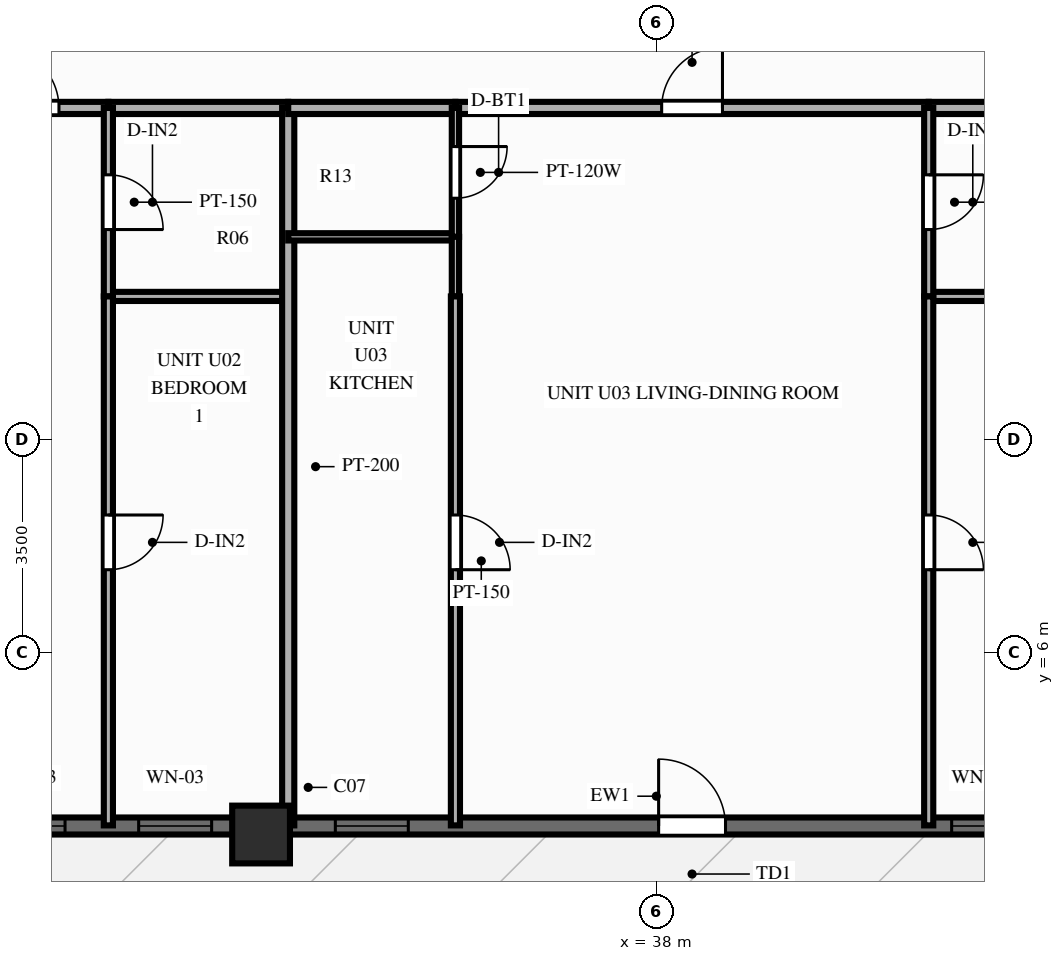
"""IFC4 building model, lengths in metres.
Left out: names, types, materials, properties, quantities, classifications, styles, units other than length and angle.
Written with IfcOpenShell. Run it as: python <this file> out.ifc"""

import sys

from ifc_helpers import new_model, si_unit, direction, frame, frame_2d, origin, origin_2d, place, context, subcontext, project, spatial, rectangle, extrude, source, transform, mapped, element, fill, save


model = new_model("IFC4")
c1 = context("Model", 3, precision=1e-05, world=origin(), true_north=direction((0.0, 1.0)))
c2 = subcontext(c1, "Body", "Model", "MODEL_VIEW")
j1 = project(units=[si_unit("LENGTHUNIT", "METRE"), si_unit("PLANEANGLEUNIT", "RADIAN")], contexts=[c1])
p1 = place(None, origin())
s1 = spatial("IfcSite", under=j1, at=p1, CompositionType="ELEMENT")
p2 = place(p1, origin())
s2 = spatial("IfcBuilding", under=s1, at=p2, CompositionType="ELEMENT")
p3 = place(p2, frame((0.0, 0.0, 77.85)))
s3 = spatial("IfcBuildingStorey", under=s2, at=p3, CompositionType="ELEMENT", Elevation=77.85)
m1 = source(origin(), c2, "Body", "SweptSolid", [
    extrude(rectangle(XDim=0.95, YDim=0.95, at=origin_2d()), origin(), (0.0, 0.0, 1.0), 3.0),
])
p4 = place(p3, frame((31.5, 3.0, 0.0), z_axis=(0.0, 0.0, 1.0), x_axis=(1.0, 0.0, 0.0)))
e1 = element("IfcColumn", 1, at=p4, inside=s3, PredefinedType="COLUMN", context=c2, shape_type="MappedRepresentation", body=[
    mapped(m1, transform((0.0, 0.0, 0.0), scale=1.0)),
])
p5 = place(p3, frame((16.2, 3.14, 0.0), z_axis=(0.0, 0.0, 1.0), x_axis=(1.0, 0.0, 0.0)))
e2 = element("IfcWall", 2, at=p5, inside=s3, PredefinedType="SOLIDWALL", context=c2, shape_type="SweptSolid", body=[
    extrude(rectangle(XDim=43.6, YDim=0.28, at=frame_2d((21.8, 0.0))), origin(), (0.0, 0.0, 1.0), 2.28),
])
p6 = place(p5, frame((0.748, 0.0, 0.25)))
e3 = element("IfcOpeningElement", 3, at=p6, cuts=e2, PredefinedType="OPENING", context=c2, shape_type="SweptSolid", body=[
    extrude(rectangle(XDim=1.2, YDim=1.5, at=frame_2d((0.6, 0.75))), frame((0.0, 0.152, 0.0), z_axis=(0.0, -1.0, 0.0), x_axis=(1.0, 0.0, 0.0)), (0.0, 0.0, 1.0), 0.304),
])
p7 = place(p5, frame((3.093, 0.0, 0.25)))
e4 = element("IfcOpeningElement", 4, at=p7, cuts=e2, PredefinedType="OPENING", context=c2, shape_type="SweptSolid", body=[
    extrude(rectangle(XDim=1.2, YDim=1.5, at=frame_2d((0.6, 0.75))), frame((0.0, 0.152, 0.0), z_axis=(0.0, -1.0, 0.0), x_axis=(1.0, 0.0, 0.0)), (0.0, 0.0, 1.0), 0.304),
])
p8 = place(p5, frame((5.885, 0.0, 0.25)))
e5 = element("IfcOpeningElement", 5, at=p8, cuts=e2, PredefinedType="OPENING", context=c2, shape_type="SweptSolid", body=[
    extrude(rectangle(XDim=1.2, YDim=1.5, at=frame_2d((0.6, 0.75))), frame((0.0, 0.152, 0.0), z_axis=(0.0, -1.0, 0.0), x_axis=(1.0, 0.0, 0.0)), (0.0, 0.0, 1.0), 0.304),
])
p9 = place(p5, frame((8.463, 0.0, 0.25)))
e6 = element("IfcOpeningElement", 6, at=p9, cuts=e2, PredefinedType="OPENING", context=c2, shape_type="SweptSolid", body=[
    extrude(rectangle(XDim=1.2, YDim=1.5, at=frame_2d((0.6, 0.75))), frame((0.0, 0.152, 0.0), z_axis=(0.0, -1.0, 0.0), x_axis=(1.0, 0.0, 0.0)), (0.0, 0.0, 1.0), 0.304),
])
p10 = place(p5, frame((10.876, 0.0, 0.25)))
e7 = element("IfcOpeningElement", 7, at=p10, cuts=e2, PredefinedType="OPENING", context=c2, shape_type="SweptSolid", body=[
    extrude(rectangle(XDim=1.2, YDim=1.5, at=frame_2d((0.6, 0.75))), frame((0.0, 0.152, 0.0), z_axis=(0.0, -1.0, 0.0), x_axis=(1.0, 0.0, 0.0)), (0.0, 0.0, 1.0), 0.304),
])
p11 = place(p5, frame((13.287, 0.0, 0.25)))
e8 = element("IfcOpeningElement", 8, at=p11, cuts=e2, PredefinedType="OPENING", context=c2, shape_type="SweptSolid", body=[
    extrude(rectangle(XDim=1.2, YDim=1.5, at=frame_2d((0.6, 0.75))), frame((0.0, 0.152, 0.0), z_axis=(0.0, -1.0, 0.0), x_axis=(1.0, 0.0, 0.0)), (0.0, 0.0, 1.0), 0.304),
])
p12 = place(p5, frame((16.521, 0.0, 0.25)))
e9 = element("IfcOpeningElement", 9, at=p12, cuts=e2, PredefinedType="OPENING", context=c2, shape_type="SweptSolid", body=[
    extrude(rectangle(XDim=1.2, YDim=1.5, at=frame_2d((0.6, 0.75))), frame((0.0, 0.152, 0.0), z_axis=(0.0, -1.0, 0.0), x_axis=(1.0, 0.0, 0.0)), (0.0, 0.0, 1.0), 0.304),
])
p13 = place(p5, frame((22.938, 0.0, 0.0), z_axis=(0.0, 0.0, 1.0), x_axis=(-1.0, 0.0, 0.0)))
e10 = element("IfcOpeningElement", 10, at=p13, cuts=e2, PredefinedType="OPENING", context=c2, shape_type="SweptSolid", body=[
    extrude(rectangle(XDim=1.1, YDim=2.15, at=frame_2d((0.55, 1.075))), frame((0.0, 0.152, 0.0), z_axis=(0.0, -1.0, 0.0), x_axis=(1.0, 0.0, 0.0)), (0.0, 0.0, 1.0), 0.304),
])
p14 = place(p5, frame((26.657, 0.0, 0.25)))
e11 = element("IfcOpeningElement", 11, at=p14, cuts=e2, PredefinedType="OPENING", context=c2, shape_type="SweptSolid", body=[
    extrude(rectangle(XDim=0.95, YDim=1.5, at=frame_2d((0.475, 0.75))), frame((0.0, 0.152, 0.0), z_axis=(0.0, -1.0, 0.0), x_axis=(1.0, 0.0, 0.0)), (0.0, 0.0, 1.0), 0.304),
])
p15 = place(p5, frame((28.965, 0.0, 0.25)))
e12 = element("IfcOpeningElement", 12, at=p15, cuts=e2, PredefinedType="OPENING", context=c2, shape_type="SweptSolid", body=[
    extrude(rectangle(XDim=0.7, YDim=1.5, at=frame_2d((0.35, 0.75))), frame((0.0, 0.152, 0.0), z_axis=(0.0, -1.0, 0.0), x_axis=(1.0, 0.0, 0.0)), (0.0, 0.0, 1.0), 0.304),
])
p16 = place(p5, frame((31.158, 0.0, 0.25)))
e13 = element("IfcOpeningElement", 13, at=p16, cuts=e2, PredefinedType="OPENING", context=c2, shape_type="SweptSolid", body=[
    extrude(rectangle(XDim=1.2, YDim=1.5, at=frame_2d((0.6, 0.75))), frame((0.0, 0.152, 0.0), z_axis=(0.0, -1.0, 0.0), x_axis=(1.0, 0.0, 0.0)), (0.0, 0.0, 1.0), 0.304),
])
p17 = place(p5, frame((35.992, 0.0, 0.25)))
e14 = element("IfcOpeningElement", 14, at=p17, cuts=e2, PredefinedType="OPENING", context=c2, shape_type="SweptSolid", body=[
    extrude(rectangle(XDim=1.2, YDim=1.5, at=frame_2d((0.6, 0.75))), frame((0.0, 0.152, 0.0), z_axis=(0.0, -1.0, 0.0), x_axis=(1.0, 0.0, 0.0)), (0.0, 0.0, 1.0), 0.304),
])
p18 = place(p5, frame((40.885, 0.0, 0.25)))
e15 = element("IfcOpeningElement", 15, at=p18, cuts=e2, PredefinedType="OPENING", context=c2, shape_type="SweptSolid", body=[
    extrude(rectangle(XDim=1.2, YDim=1.5, at=frame_2d((0.6, 0.75))), frame((0.0, 0.152, 0.0), z_axis=(0.0, -1.0, 0.0), x_axis=(1.0, 0.0, 0.0)), (0.0, 0.0, 1.0), 0.304),
])
p19 = place(p3, frame((26.363, 14.95, 0.0), z_axis=(0.0, 0.0, 1.0), x_axis=(1.0, 0.0, 0.0)))
e16 = element("IfcWall", 16, at=p19, inside=s3, PredefinedType="PARTITIONING", context=c2, shape_type="SweptSolid", body=[
    extrude(rectangle(XDim=2.625, YDim=0.2, at=frame_2d((1.313, 0.0))), origin(), (0.0, 0.0, 1.0), 2.79),
])
p20 = place(p19, frame((0.813, 0.0, 0.0)))
e17 = element("IfcOpeningElement", 17, at=p20, cuts=e16, PredefinedType="OPENING", context=c2, shape_type="SweptSolid", body=[
    extrude(rectangle(XDim=1.0, YDim=2.15, at=frame_2d((0.5, 1.075))), frame((0.0, 0.112, 0.0), z_axis=(0.0, -1.0, 0.0), x_axis=(1.0, 0.0, 0.0)), (0.0, 0.0, 1.0), 0.224),
])
p21 = place(p3, frame((28.989, 14.95, 0.0), z_axis=(0.0, 0.0, 1.0), x_axis=(1.0, 0.0, 0.0)))
e18 = element("IfcWall", 18, at=p21, inside=s3, PredefinedType="PARTITIONING", context=c2, shape_type="SweptSolid", body=[
    extrude(rectangle(XDim=2.958, YDim=0.2, at=frame_2d((1.479, 0.0))), origin(), (0.0, 0.0, 1.0), 2.79),
])
p22 = place(p3, frame((28.989, 11.85, 0.0), z_axis=(0.0, 0.0, 1.0), x_axis=(1.0, 0.0, 0.0)))
e19 = element("IfcWall", 19, at=p22, inside=s3, PredefinedType="PARTITIONING", context=c2, shape_type="SweptSolid", body=[
    extrude(rectangle(XDim=2.958, YDim=0.15, at=frame_2d((1.479, 0.0))), origin(), (0.0, 0.0, 1.0), 2.79),
])
p23 = place(p3, frame((28.989, 14.95, 0.0), z_axis=(0.0, 0.0, 1.0), x_axis=(0.0, -1.0, 0.0)))
e20 = element("IfcWall", 20, at=p23, inside=s3, PredefinedType="PARTITIONING", context=c2, shape_type="SweptSolid", body=[
    extrude(rectangle(XDim=3.1, YDim=0.15, at=frame_2d((1.55, 0.0))), origin(), (0.0, 0.0, 1.0), 2.79),
])
p24 = place(p23, frame((1.1, 0.0, 0.0)))
e21 = element("IfcOpeningElement", 21, at=p24, cuts=e20, PredefinedType="OPENING", context=c2, shape_type="SweptSolid", body=[
    extrude(rectangle(XDim=0.9, YDim=2.1, at=frame_2d((0.45, 1.05))), frame((0.0, 0.087, 0.0), z_axis=(0.0, -1.0, 0.0), x_axis=(1.0, 0.0, 0.0)), (0.0, 0.0, 1.0), 0.174),
])
p25 = place(p3, frame((28.989, 11.85, 0.0), z_axis=(0.0, 0.0, 1.0), x_axis=(0.0, -1.0, 0.0)))
e22 = element("IfcWall", 22, at=p25, inside=s3, PredefinedType="PARTITIONING", context=c2, shape_type="SweptSolid", body=[
    extrude(rectangle(XDim=8.7, YDim=0.15, at=frame_2d((4.35, 0.0))), origin(), (0.0, 0.0, 1.0), 2.79),
])
p26 = place(p25, frame((3.595, 0.0, 0.0)))
e23 = element("IfcOpeningElement", 23, at=p26, cuts=e22, PredefinedType="OPENING", context=c2, shape_type="SweptSolid", body=[
    extrude(rectangle(XDim=0.9, YDim=2.1, at=frame_2d((0.45, 1.05))), frame((0.0, 0.087, 0.0), z_axis=(0.0, -1.0, 0.0), x_axis=(1.0, 0.0, 0.0)), (0.0, 0.0, 1.0), 0.174),
])
p27 = place(p3, frame((31.946, 14.95, 0.0), z_axis=(0.0, 0.0, 1.0), x_axis=(0.0, -1.0, 0.0)))
e24 = element("IfcWall", 24, at=p27, inside=s3, PredefinedType="PARTITIONING", context=c2, shape_type="SweptSolid", body=[
    extrude(rectangle(XDim=11.8, YDim=0.2, at=frame_2d((5.9, 0.0))), origin(), (0.0, 0.0, 1.0), 2.79),
])
p28 = place(p3, frame((31.946, 14.95, 0.0), z_axis=(0.0, 0.0, 1.0), x_axis=(1.0, 0.0, 0.0)))
e25 = element("IfcWall", 25, at=p28, inside=s3, PredefinedType="PARTITIONING", context=c2, shape_type="SweptSolid", body=[
    extrude(rectangle(XDim=2.75, YDim=0.2, at=frame_2d((1.375, 0.0))), origin(), (0.0, 0.0, 1.0), 2.79),
])
p29 = place(p3, frame((34.696, 14.95, 0.0), z_axis=(0.0, 0.0, 1.0), x_axis=(1.0, 0.0, 0.0)))
e26 = element("IfcWall", 26, at=p29, inside=s3, PredefinedType="PARTITIONING", context=c2, shape_type="SweptSolid", body=[
    extrude(rectangle(XDim=7.784, YDim=0.2, at=frame_2d((3.892, 0.0))), origin(), (0.0, 0.0, 1.0), 2.79),
])
p30 = place(p29, frame((3.392, 0.0, 0.0)))
e27 = element("IfcOpeningElement", 27, at=p30, cuts=e26, PredefinedType="OPENING", context=c2, shape_type="SweptSolid", body=[
    extrude(rectangle(XDim=1.0, YDim=2.15, at=frame_2d((0.5, 1.075))), frame((0.0, 0.112, 0.0), z_axis=(0.0, -1.0, 0.0), x_axis=(1.0, 0.0, 0.0)), (0.0, 0.0, 1.0), 0.224),
])
p31 = place(p3, frame((42.48, 14.95, 0.0), z_axis=(0.0, 0.0, 1.0), x_axis=(1.0, 0.0, 0.0)))
e28 = element("IfcWall", 28, at=p31, inside=s3, PredefinedType="PARTITIONING", context=c2, shape_type="SweptSolid", body=[
    extrude(rectangle(XDim=3.736, YDim=0.2, at=frame_2d((1.868, 0.0))), origin(), (0.0, 0.0, 1.0), 2.79),
])
p32 = place(p3, frame((31.946, 12.83, 0.0), z_axis=(0.0, 0.0, 1.0), x_axis=(1.0, 0.0, 0.0)))
e29 = element("IfcWall", 29, at=p32, inside=s3, PredefinedType="PARTITIONING", context=c2, shape_type="SweptSolid", body=[
    extrude(rectangle(XDim=2.75, YDim=0.12, at=frame_2d((1.375, 0.0))), origin(), (0.0, 0.0, 1.0), 2.79),
])
p33 = place(p3, frame((42.48, 11.85, 0.0), z_axis=(0.0, 0.0, 1.0), x_axis=(1.0, 0.0, 0.0)))
e30 = element("IfcWall", 30, at=p33, inside=s3, PredefinedType="PARTITIONING", context=c2, shape_type="SweptSolid", body=[
    extrude(rectangle(XDim=3.736, YDim=0.15, at=frame_2d((1.868, 0.0))), origin(), (0.0, 0.0, 1.0), 2.79),
])
p34 = place(p3, frame((34.696, 14.95, 0.0), z_axis=(0.0, 0.0, 1.0), x_axis=(0.0, -1.0, 0.0)))
e31 = element("IfcWall", 31, at=p34, inside=s3, PredefinedType="PARTITIONING", context=c2, shape_type="SweptSolid", body=[
    extrude(rectangle(XDim=2.12, YDim=0.12, at=frame_2d((1.06, 0.0))), origin(), (0.0, 0.0, 1.0), 2.79),
])
p35 = place(p34, frame((0.635, 0.0, 0.0)))
e32 = element("IfcOpeningElement", 32, at=p35, cuts=e31, PredefinedType="OPENING", context=c2, shape_type="SweptSolid", body=[
    extrude(rectangle(XDim=0.85, YDim=2.05, at=frame_2d((0.425, 1.025))), frame((0.0, 0.072, 0.0), z_axis=(0.0, -1.0, 0.0), x_axis=(1.0, 0.0, 0.0)), (0.0, 0.0, 1.0), 0.144),
])
p36 = place(p3, frame((34.696, 12.83, 0.0), z_axis=(0.0, 0.0, 1.0), x_axis=(0.0, -1.0, 0.0)))
e33 = element("IfcWall", 33, at=p36, inside=s3, PredefinedType="PARTITIONING", context=c2, shape_type="SweptSolid", body=[
    extrude(rectangle(XDim=0.98, YDim=0.12, at=frame_2d((0.49, 0.0))), origin(), (0.0, 0.0, 1.0), 2.79),
])
p37 = place(p3, frame((34.696, 11.85, 0.0), z_axis=(0.0, 0.0, 1.0), x_axis=(0.0, -1.0, 0.0)))
e34 = element("IfcWall", 34, at=p37, inside=s3, PredefinedType="PARTITIONING", context=c2, shape_type="SweptSolid", body=[
    extrude(rectangle(XDim=8.7, YDim=0.15, at=frame_2d((4.35, 0.0))), origin(), (0.0, 0.0, 1.0), 2.79),
])
p38 = place(p37, frame((3.595, 0.0, 0.0)))
e35 = element("IfcOpeningElement", 35, at=p38, cuts=e34, PredefinedType="OPENING", context=c2, shape_type="SweptSolid", body=[
    extrude(rectangle(XDim=0.9, YDim=2.1, at=frame_2d((0.45, 1.05))), frame((0.0, 0.087, 0.0), z_axis=(0.0, -1.0, 0.0), x_axis=(1.0, 0.0, 0.0)), (0.0, 0.0, 1.0), 0.174),
])
p39 = place(p3, frame((42.48, 14.95, 0.0), z_axis=(0.0, 0.0, 1.0), x_axis=(0.0, -1.0, 0.0)))
e36 = element("IfcWall", 36, at=p39, inside=s3, PredefinedType="PARTITIONING", context=c2, shape_type="SweptSolid", body=[
    extrude(rectangle(XDim=3.1, YDim=0.15, at=frame_2d((1.55, 0.0))), origin(), (0.0, 0.0, 1.0), 2.79),
])
p40 = place(p39, frame((1.1, 0.0, 0.0)))
e37 = element("IfcOpeningElement", 37, at=p40, cuts=e36, PredefinedType="OPENING", context=c2, shape_type="SweptSolid", body=[
    extrude(rectangle(XDim=0.9, YDim=2.1, at=frame_2d((0.45, 1.05))), frame((0.0, 0.087, 0.0), z_axis=(0.0, -1.0, 0.0), x_axis=(1.0, 0.0, 0.0)), (0.0, 0.0, 1.0), 0.174),
])
p41 = place(p3, frame((42.48, 11.85, 0.0), z_axis=(0.0, 0.0, 1.0), x_axis=(0.0, -1.0, 0.0)))
e38 = element("IfcWall", 38, at=p41, inside=s3, PredefinedType="PARTITIONING", context=c2, shape_type="SweptSolid", body=[
    extrude(rectangle(XDim=8.7, YDim=0.15, at=frame_2d((4.35, 0.0))), origin(), (0.0, 0.0, 1.0), 2.79),
])
p42 = place(p41, frame((3.595, 0.0, 0.0)))
e39 = element("IfcOpeningElement", 39, at=p42, cuts=e38, PredefinedType="OPENING", context=c2, shape_type="SweptSolid", body=[
    extrude(rectangle(XDim=0.9, YDim=2.1, at=frame_2d((0.45, 1.05))), frame((0.0, 0.087, 0.0), z_axis=(0.0, -1.0, 0.0), x_axis=(1.0, 0.0, 0.0)), (0.0, 0.0, 1.0), 0.174),
])
m2 = source(origin(), c2, "Body", "SweptSolid", [
    extrude(rectangle(XDim=1.2, YDim=1.5, at=frame_2d((0.6, 0.75))), frame((0.0, 0.03, 0.0), z_axis=(0.0, -1.0, 0.0), x_axis=(1.0, 0.0, 0.0)), (0.0, 0.0, 1.0), 0.06),
])
p43 = place(p10, origin())
e40 = element("IfcWindow", 40, at=p43, inside=s3, PartitioningType="SINGLE_PANEL", PredefinedType="WINDOW", context=c2, shape_type="MappedRepresentation", body=[
    mapped(m2, transform((0.0, 0.0, 0.0), scale=1.0)),
])
fill(e7, e40)
p44 = place(p11, origin())
e41 = element("IfcWindow", 41, at=p44, inside=s3, PartitioningType="SINGLE_PANEL", PredefinedType="WINDOW", context=c2, shape_type="MappedRepresentation", body=[
    mapped(m2, transform((0.0, 0.0, 0.0), scale=1.0)),
])
fill(e8, e41)
p45 = place(p12, origin())
e42 = element("IfcWindow", 42, at=p45, inside=s3, PartitioningType="SINGLE_PANEL", PredefinedType="WINDOW", context=c2, shape_type="MappedRepresentation", body=[
    mapped(m2, transform((0.0, 0.0, 0.0), scale=1.0)),
])
fill(e9, e42)
m3 = source(origin(), c2, "Body", "SweptSolid", [
    extrude(rectangle(XDim=1.1, YDim=2.15, at=frame_2d((0.55, 1.075))), frame((0.0, 0.025, 0.0), z_axis=(0.0, -1.0, 0.0), x_axis=(1.0, 0.0, 0.0)), (0.0, 0.0, 1.0), 0.05),
])
p46 = place(p13, origin())
e43 = element("IfcDoor", 43, at=p46, inside=s3, OperationType="SINGLE_SWING_RIGHT", PredefinedType="DOOR", context=c2, shape_type="MappedRepresentation", body=[
    mapped(m3, transform((0.0, 0.0, 0.0), scale=1.0)),
])
fill(e10, e43)
m4 = source(origin(), c2, "Body", "SweptSolid", [
    extrude(rectangle(XDim=0.95, YDim=1.5, at=frame_2d((0.475, 0.75))), frame((0.0, 0.03, 0.0), z_axis=(0.0, -1.0, 0.0), x_axis=(1.0, 0.0, 0.0)), (0.0, 0.0, 1.0), 0.06),
])
p47 = place(p14, origin())
e44 = element("IfcWindow", 44, at=p47, inside=s3, PartitioningType="SINGLE_PANEL", PredefinedType="WINDOW", context=c2, shape_type="MappedRepresentation", body=[
    mapped(m4, transform((0.0, 0.0, 0.0), scale=1.0)),
])
fill(e11, e44)
m5 = source(origin(), c2, "Body", "SweptSolid", [
    extrude(rectangle(XDim=1.0, YDim=2.15, at=frame_2d((0.5, 1.075))), frame((0.0, 0.025, 0.0), z_axis=(0.0, -1.0, 0.0), x_axis=(1.0, 0.0, 0.0)), (0.0, 0.0, 1.0), 0.05),
])
p48 = place(p20, origin())
e45 = element("IfcDoor", 45, at=p48, inside=s3, OperationType="SINGLE_SWING_LEFT", PredefinedType="DOOR", context=c2, shape_type="MappedRepresentation", body=[
    mapped(m5, transform((0.0, 0.0, 0.0), scale=1.0)),
])
fill(e17, e45)
m6 = source(origin(), c2, "Body", "SweptSolid", [
    extrude(rectangle(XDim=0.9, YDim=2.1, at=frame_2d((0.45, 1.05))), frame((0.0, 0.025, 0.0), z_axis=(0.0, -1.0, 0.0), x_axis=(1.0, 0.0, 0.0)), (0.0, 0.0, 1.0), 0.05),
])
p49 = place(p24, origin())
e46 = element("IfcDoor", 46, at=p49, inside=s3, OperationType="SINGLE_SWING_RIGHT", PredefinedType="DOOR", context=c2, shape_type="MappedRepresentation", body=[
    mapped(m6, transform((0.0, 0.0, 0.0), scale=1.0)),
])
fill(e21, e46)
p50 = place(p26, origin())
e47 = element("IfcDoor", 47, at=p50, inside=s3, OperationType="SINGLE_SWING_LEFT", PredefinedType="DOOR", context=c2, shape_type="MappedRepresentation", body=[
    mapped(m6, transform((0.0, 0.0, 0.0), scale=1.0)),
])
fill(e23, e47)
p51 = place(p30, origin())
e48 = element("IfcDoor", 48, at=p51, inside=s3, OperationType="SINGLE_SWING_RIGHT", PredefinedType="DOOR", context=c2, shape_type="MappedRepresentation", body=[
    mapped(m5, transform((0.0, 0.0, 0.0), scale=1.0)),
])
fill(e27, e48)
m7 = source(origin(), c2, "Body", "SweptSolid", [
    extrude(rectangle(XDim=0.85, YDim=2.05, at=frame_2d((0.425, 1.025))), frame((0.0, 0.025, 0.0), z_axis=(0.0, -1.0, 0.0), x_axis=(1.0, 0.0, 0.0)), (0.0, 0.0, 1.0), 0.05),
])
p52 = place(p35, origin())
e49 = element("IfcDoor", 49, at=p52, inside=s3, OperationType="SINGLE_SWING_LEFT", PredefinedType="DOOR", context=c2, shape_type="MappedRepresentation", body=[
    mapped(m7, transform((0.0, 0.0, 0.0), scale=1.0)),
])
fill(e32, e49)
p53 = place(p38, origin())
e50 = element("IfcDoor", 50, at=p53, inside=s3, OperationType="SINGLE_SWING_RIGHT", PredefinedType="DOOR", context=c2, shape_type="MappedRepresentation", body=[
    mapped(m6, transform((0.0, 0.0, 0.0), scale=1.0)),
])
fill(e35, e50)
p54 = place(p40, origin())
e51 = element("IfcDoor", 51, at=p54, inside=s3, OperationType="SINGLE_SWING_LEFT", PredefinedType="DOOR", context=c2, shape_type="MappedRepresentation", body=[
    mapped(m6, transform((0.0, 0.0, 0.0), scale=1.0)),
])
fill(e37, e51)
p55 = place(p42, origin())
e52 = element("IfcDoor", 52, at=p55, inside=s3, OperationType="SINGLE_SWING_RIGHT", PredefinedType="DOOR", context=c2, shape_type="MappedRepresentation", body=[
    mapped(m6, transform((0.0, 0.0, 0.0), scale=1.0)),
])
fill(e39, e52)
save(model, sys.argv[1])
